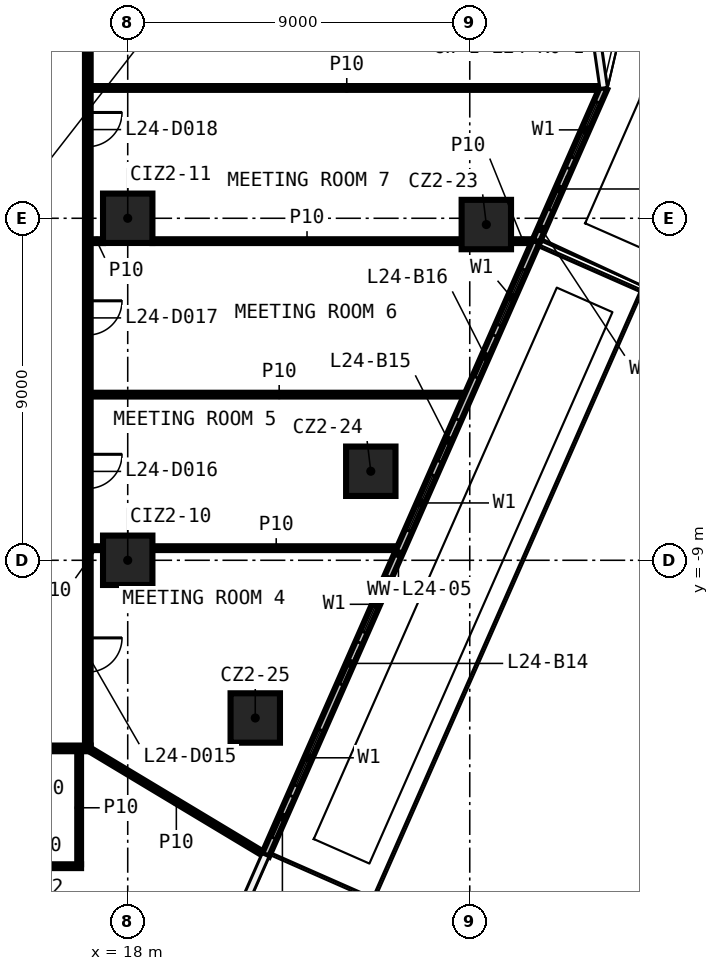
"""IFC4 building model, lengths in metres.
Left out: names, types, materials, properties, quantities, classifications, styles, units other than length and angle.
Written with IfcOpenShell. Run it as: python <this file> out.ifc"""

import sys

from ifc_helpers import new_model, si_unit, direction, frame, frame_2d, origin, origin_2d, place, context, subcontext, project, spatial, rectangle, extrude, element, fill, save


model = new_model("IFC4")
c1 = context("Model", 3, precision=1e-05, world=origin(), true_north=direction((0.0, 1.0)))
c2 = subcontext(c1, "Body", "Model", "MODEL_VIEW")
j1 = project(units=[si_unit("LENGTHUNIT", "METRE"), si_unit("PLANEANGLEUNIT", "RADIAN")], contexts=[c1])
p1 = place(None, origin())
s1 = spatial("IfcSite", under=j1, at=p1, CompositionType="ELEMENT")
p2 = place(p1, origin())
s2 = spatial("IfcBuilding", under=s1, at=p2, CompositionType="ELEMENT")
p3 = place(p2, frame((0.0, 0.0, 113.7)))
s3 = spatial("IfcBuildingStorey", under=s2, at=p3, CompositionType="ELEMENT", Elevation=113.7)
for number, where, z_axis, x_axis in (
    (1, (27.436, -0.165, 0.0), (0.0, 0.0, 1.0), (1.0, 0.0, 0.0)),
    (2, (24.396, -6.657, 0.0), (0.0, 0.0, 1.0), (1.0, 0.0, 0.0)),
    (3, (21.356, -13.15, 0.0), (0.0, 0.0, 1.0), (1.0, 0.0, 0.0)),
    (4, (18.0, -9.0, 0.0), (0.0, 0.0, 1.0), (1.0, 0.0, 0.0)),
    (5, (18.0, 0.0, 0.0), (0.0, 0.0, 1.0), (1.0, 0.0, 0.0)),
):
    element("IfcColumn", number, at=place(p3, frame(where, z_axis=z_axis, x_axis=x_axis)), inside=s3, PredefinedType="COLUMN", context=c2, shape_type="SweptSolid", body=[
        extrude(rectangle(XDim=1.3, YDim=1.3, at=origin_2d()), origin(), (0.0, 0.0, 1.0), 3.3),
    ])
p4 = place(p3, frame((14.272, -17.05, 0.0), z_axis=(0.0, 0.0, 1.0), x_axis=(1.0, 0.0, 0.0)))
e6 = element("IfcWall", 6, at=p4, inside=s3, PredefinedType="PARTITIONING", context=c2, shape_type="SweptSolid", body=[
    extrude(rectangle(XDim=2.5, YDim=0.1, at=frame_2d((1.25, 0.0))), origin(), (0.0, 0.0, 1.0), 3.3),
])
p5 = place(p3, frame((17.025, -13.95, 0.0), z_axis=(0.0, 0.0, 1.0), x_axis=(-1.0, 0.0, 0.0)))
e7 = element("IfcWall", 7, at=p5, inside=s3, PredefinedType="PARTITIONING", context=c2, shape_type="SweptSolid", body=[
    extrude(rectangle(XDim=34.05, YDim=0.15, at=frame_2d((17.025, 0.0))), origin(), (0.0, 0.0, 1.0), 3.3),
])
p6 = place(p5, frame((31.974, 0.0, 0.0)))
e8 = element("IfcOpeningElement", 8, at=p6, cuts=e7, PredefinedType="OPENING", context=c2, shape_type="SweptSolid", body=[
    extrude(rectangle(XDim=0.9, YDim=2.1, at=frame_2d((0.45, 1.05))), frame((0.0, 0.085, 0.0), z_axis=(0.0, -1.0, 0.0), x_axis=(1.0, 0.0, 0.0)), (0.0, 0.0, 1.0), 0.17),
])
p7 = place(p5, frame((27.543, 0.0, 0.0)))
e9 = element("IfcOpeningElement", 9, at=p7, cuts=e7, PredefinedType="OPENING", context=c2, shape_type="SweptSolid", body=[
    extrude(rectangle(XDim=1.0, YDim=2.1, at=frame_2d((0.5, 1.05))), frame((0.0, 0.085, 0.0), z_axis=(0.0, -1.0, 0.0), x_axis=(1.0, 0.0, 0.0)), (0.0, 0.0, 1.0), 0.17),
])
p8 = place(p5, frame((16.333, 0.0, 0.0)))
e10 = element("IfcOpeningElement", 10, at=p8, cuts=e7, PredefinedType="OPENING", context=c2, shape_type="SweptSolid", body=[
    extrude(rectangle(XDim=1.0, YDim=2.1, at=frame_2d((0.5, 1.05))), frame((0.0, 0.085, 0.0), z_axis=(0.0, -1.0, 0.0), x_axis=(1.0, 0.0, 0.0)), (0.0, 0.0, 1.0), 0.17),
])
p9 = place(p5, frame((12.006, 0.0, 0.0)))
e11 = element("IfcOpeningElement", 11, at=p9, cuts=e7, PredefinedType="OPENING", context=c2, shape_type="SweptSolid", body=[
    extrude(rectangle(XDim=1.0, YDim=2.1, at=frame_2d((0.5, 1.05))), frame((0.0, 0.085, 0.0), z_axis=(0.0, -1.0, 0.0), x_axis=(1.0, 0.0, 0.0)), (0.0, 0.0, 1.0), 0.17),
])
p10 = place(p5, frame((5.124, 0.0, 0.0)))
e12 = element("IfcOpeningElement", 12, at=p10, cuts=e7, PredefinedType="OPENING", context=c2, shape_type="SweptSolid", body=[
    extrude(rectangle(XDim=1.0, YDim=2.1, at=frame_2d((0.5, 1.05))), frame((0.0, 0.085, 0.0), z_axis=(0.0, -1.0, 0.0), x_axis=(1.0, 0.0, 0.0)), (0.0, 0.0, 1.0), 0.17),
])
p11 = place(p5, frame((3.144, 0.0, 0.0)))
e13 = element("IfcOpeningElement", 13, at=p11, cuts=e7, PredefinedType="OPENING", context=c2, shape_type="SweptSolid", body=[
    extrude(rectangle(XDim=1.0, YDim=2.1, at=frame_2d((0.5, 1.05))), frame((0.0, 0.085, 0.0), z_axis=(0.0, -1.0, 0.0), x_axis=(1.0, 0.0, 0.0)), (0.0, 0.0, 1.0), 0.17),
])
p12 = place(p3, frame((17.025, -8.681, 0.0), z_axis=(0.0, 0.0, 1.0), x_axis=(1.0, 0.0, 0.0)))
e14 = element("IfcWall", 14, at=p12, inside=s3, PredefinedType="PARTITIONING", context=c2, shape_type="SweptSolid", body=[
    extrude(rectangle(XDim=0.325, YDim=0.1, at=frame_2d((0.163, 0.0))), origin(), (0.0, 0.0, 1.0), 3.3),
])
p13 = place(p3, frame((18.65, -8.681, 0.0), z_axis=(0.0, 0.0, 1.0), x_axis=(1.0, 0.0, 0.0)))
e15 = element("IfcWall", 15, at=p13, inside=s3, PredefinedType="PARTITIONING", context=c2, shape_type="SweptSolid", body=[
    extrude(rectangle(XDim=6.515, YDim=0.1, at=frame_2d((3.258, 0.0))), origin(), (0.0, 0.0, 1.0), 3.3),
])
p14 = place(p3, frame((17.025, -4.641, 0.0), z_axis=(0.0, 0.0, 1.0), x_axis=(1.0, 0.0, 0.0)))
e16 = element("IfcWall", 16, at=p14, inside=s3, PredefinedType="PARTITIONING", context=c2, shape_type="SweptSolid", body=[
    extrude(rectangle(XDim=9.92, YDim=0.1, at=frame_2d((4.96, 0.0))), origin(), (0.0, 0.0, 1.0), 3.3),
])
p15 = place(p3, frame((17.025, -0.602, 0.0), z_axis=(0.0, 0.0, 1.0), x_axis=(1.0, 0.0, 0.0)))
e17 = element("IfcWall", 17, at=p15, inside=s3, PredefinedType="PARTITIONING", context=c2, shape_type="SweptSolid", body=[
    extrude(rectangle(XDim=0.325, YDim=0.1, at=frame_2d((0.163, 0.0))), origin(), (0.0, 0.0, 1.0), 3.3),
])
p16 = place(p3, frame((18.65, -0.602, 0.0), z_axis=(0.0, 0.0, 1.0), x_axis=(1.0, 0.0, 0.0)))
e18 = element("IfcWall", 18, at=p16, inside=s3, PredefinedType="PARTITIONING", context=c2, shape_type="SweptSolid", body=[
    extrude(rectangle(XDim=8.136, YDim=0.1, at=frame_2d((4.068, 0.0))), origin(), (0.0, 0.0, 1.0), 3.3),
])
p17 = place(p3, frame((28.086, -0.602, 0.0), z_axis=(0.0, 0.0, 1.0), x_axis=(1.0, 0.0, 0.0)))
e19 = element("IfcWall", 19, at=p17, inside=s3, PredefinedType="PARTITIONING", context=c2, shape_type="SweptSolid", body=[
    extrude(rectangle(XDim=0.64, YDim=0.1, at=frame_2d((0.32, 0.0))), origin(), (0.0, 0.0, 1.0), 3.3),
])
p18 = place(p3, frame((17.025, 3.429, 0.0), z_axis=(0.0, 0.0, 1.0), x_axis=(1.0, 0.0, 0.0)))
e20 = element("IfcWall", 20, at=p18, inside=s3, PredefinedType="PARTITIONING", context=c2, shape_type="SweptSolid", body=[
    extrude(rectangle(XDim=13.477, YDim=0.1, at=frame_2d((6.739, 0.0))), origin(), (0.0, 0.0, 1.0), 3.3),
])
p19 = place(p3, frame((16.95, 13.875, 0.0), z_axis=(0.0, 0.0, 1.0), x_axis=(0.0, -1.0, 0.0)))
e21 = element("IfcWall", 21, at=p19, inside=s3, PredefinedType="PARTITIONING", context=c2, shape_type="SweptSolid", body=[
    extrude(rectangle(XDim=27.75, YDim=0.15, at=frame_2d((13.875, 0.0))), origin(), (0.0, 0.0, 1.0), 3.3),
])
p20 = place(p19, frame((24.917, 0.0, 0.0)))
e22 = element("IfcOpeningElement", 22, at=p20, cuts=e21, PredefinedType="OPENING", context=c2, shape_type="SweptSolid", body=[
    extrude(rectangle(XDim=0.9, YDim=2.1, at=frame_2d((0.45, 1.05))), frame((0.0, 0.085, 0.0), z_axis=(0.0, -1.0, 0.0), x_axis=(1.0, 0.0, 0.0)), (0.0, 0.0, 1.0), 0.17),
])
p21 = place(p19, frame((20.086, 0.0, 0.0)))
e23 = element("IfcOpeningElement", 23, at=p21, cuts=e21, PredefinedType="OPENING", context=c2, shape_type="SweptSolid", body=[
    extrude(rectangle(XDim=0.9, YDim=2.1, at=frame_2d((0.45, 1.05))), frame((0.0, 0.085, 0.0), z_axis=(0.0, -1.0, 0.0), x_axis=(1.0, 0.0, 0.0)), (0.0, 0.0, 1.0), 0.17),
])
p22 = place(p19, frame((16.047, 0.0, 0.0)))
e24 = element("IfcOpeningElement", 24, at=p22, cuts=e21, PredefinedType="OPENING", context=c2, shape_type="SweptSolid", body=[
    extrude(rectangle(XDim=0.9, YDim=2.1, at=frame_2d((0.45, 1.05))), frame((0.0, 0.085, 0.0), z_axis=(0.0, -1.0, 0.0), x_axis=(1.0, 0.0, 0.0)), (0.0, 0.0, 1.0), 0.17),
])
p23 = place(p19, frame((11.091, 0.0, 0.0)))
e25 = element("IfcOpeningElement", 25, at=p23, cuts=e21, PredefinedType="OPENING", context=c2, shape_type="SweptSolid", body=[
    extrude(rectangle(XDim=0.9, YDim=2.1, at=frame_2d((0.45, 1.05))), frame((0.0, 0.085, 0.0), z_axis=(0.0, -1.0, 0.0), x_axis=(1.0, 0.0, 0.0)), (0.0, 0.0, 1.0), 0.17),
])
p24 = place(p19, frame((7.093, 0.0, 0.0)))
e26 = element("IfcOpeningElement", 26, at=p24, cuts=e21, PredefinedType="OPENING", context=c2, shape_type="SweptSolid", body=[
    extrude(rectangle(XDim=0.9, YDim=2.1, at=frame_2d((0.45, 1.05))), frame((0.0, 0.085, 0.0), z_axis=(0.0, -1.0, 0.0), x_axis=(1.0, 0.0, 0.0)), (0.0, 0.0, 1.0), 0.17),
])
p25 = place(p19, frame((2.057, 0.0, 0.0)))
e27 = element("IfcOpeningElement", 27, at=p25, cuts=e21, PredefinedType="OPENING", context=c2, shape_type="SweptSolid", body=[
    extrude(rectangle(XDim=0.9, YDim=2.1, at=frame_2d((0.45, 1.05))), frame((0.0, 0.085, 0.0), z_axis=(0.0, -1.0, 0.0), x_axis=(1.0, 0.0, 0.0)), (0.0, 0.0, 1.0), 0.17),
])
p26 = place(p3, frame((16.722, -17.0, 0.0), z_axis=(0.0, 0.0, 1.0), x_axis=(0.0, 1.0, 0.0)))
e28 = element("IfcWall", 28, at=p26, inside=s3, PredefinedType="PARTITIONING", context=c2, shape_type="SweptSolid", body=[
    extrude(rectangle(XDim=2.975, YDim=0.1, at=frame_2d((1.488, 0.0))), origin(), (0.0, 0.0, 1.0), 3.3),
])
p27 = place(p3, frame((16.95, -13.95, 0.0), z_axis=(0.0, 0.0, 1.0), x_axis=(0.857183640751, -0.515010879525, 0.0)))
e29 = element("IfcWall", 29, at=p27, inside=s3, PredefinedType="PARTITIONING", context=c2, shape_type="SweptSolid", body=[
    extrude(rectangle(XDim=5.436, YDim=0.1, at=frame_2d((2.718, 0.0))), origin(), (0.0, 0.0, 1.0), 3.3),
])
p28 = place(p3, frame((21.626, -16.76, 0.0), z_axis=(0.0, 0.0, 1.0), x_axis=(0.403293642116, 0.915070619258, 0.0)))
e30 = element("IfcWall", 30, at=p28, inside=s3, PredefinedType="SOLIDWALL", context=c2, shape_type="SweptSolid", body=[
    extrude(rectangle(XDim=17.657, YDim=0.2, at=frame_2d((8.829, 0.0))), origin(), (0.0, 0.0, 1.0), 3.3),
])
p29 = place(p28, frame((2.0, 0.0, 0.6)))
e31 = element("IfcOpeningElement", 31, at=p29, cuts=e30, PredefinedType="OPENING", context=c2, shape_type="SweptSolid", body=[
    extrude(rectangle(XDim=1.6, YDim=2.4, at=frame_2d((0.8, 1.2))), frame((0.0, 0.11, 0.0), z_axis=(0.0, -1.0, 0.0), x_axis=(1.0, 0.0, 0.0)), (0.0, 0.0, 1.0), 0.22),
])
p30 = place(p28, frame((0.5, 0.0, 0.0)))
e32 = element("IfcOpeningElement", 32, at=p30, cuts=e30, PredefinedType="OPENING", context=c2, shape_type="SweptSolid", body=[
    extrude(rectangle(XDim=1.2, YDim=2.4, at=frame_2d((0.6, 1.2))), frame((0.0, 0.11, 0.0), z_axis=(0.0, -1.0, 0.0), x_axis=(1.0, 0.0, 0.0)), (0.0, 0.0, 1.0), 0.22),
])
p31 = place(p28, frame((6.414, 0.0, 0.6)))
e33 = element("IfcOpeningElement", 33, at=p31, cuts=e30, PredefinedType="OPENING", context=c2, shape_type="SweptSolid", body=[
    extrude(rectangle(XDim=1.6, YDim=2.4, at=frame_2d((0.8, 1.2))), frame((0.0, 0.11, 0.0), z_axis=(0.0, -1.0, 0.0), x_axis=(1.0, 0.0, 0.0)), (0.0, 0.0, 1.0), 0.22),
])
p32 = place(p28, frame((4.914, 0.0, 0.0)))
e34 = element("IfcOpeningElement", 34, at=p32, cuts=e30, PredefinedType="OPENING", context=c2, shape_type="SweptSolid", body=[
    extrude(rectangle(XDim=1.2, YDim=2.4, at=frame_2d((0.6, 1.2))), frame((0.0, 0.11, 0.0), z_axis=(0.0, -1.0, 0.0), x_axis=(1.0, 0.0, 0.0)), (0.0, 0.0, 1.0), 0.22),
])
p33 = place(p28, frame((9.329, 0.0, 0.6)))
e35 = element("IfcOpeningElement", 35, at=p33, cuts=e30, PredefinedType="OPENING", context=c2, shape_type="SweptSolid", body=[
    extrude(rectangle(XDim=1.6, YDim=2.4, at=frame_2d((0.8, 1.2))), frame((0.0, 0.11, 0.0), z_axis=(0.0, -1.0, 0.0), x_axis=(1.0, 0.0, 0.0)), (0.0, 0.0, 1.0), 0.22),
])
p34 = place(p28, frame((11.329, 0.0, 0.0)))
e36 = element("IfcOpeningElement", 36, at=p34, cuts=e30, PredefinedType="OPENING", context=c2, shape_type="SweptSolid", body=[
    extrude(rectangle(XDim=1.2, YDim=2.4, at=frame_2d((0.6, 1.2))), frame((0.0, 0.11, 0.0), z_axis=(0.0, -1.0, 0.0), x_axis=(1.0, 0.0, 0.0)), (0.0, 0.0, 1.0), 0.22),
])
p35 = place(p28, frame((15.243, 0.0, 0.6)))
e37 = element("IfcOpeningElement", 37, at=p35, cuts=e30, PredefinedType="OPENING", context=c2, shape_type="SweptSolid", body=[
    extrude(rectangle(XDim=1.6, YDim=2.4, at=frame_2d((0.8, 1.2))), frame((0.0, 0.11, 0.0), z_axis=(0.0, -1.0, 0.0), x_axis=(1.0, 0.0, 0.0)), (0.0, 0.0, 1.0), 0.22),
])
p36 = place(p28, frame((13.743, 0.0, 0.0)))
e38 = element("IfcOpeningElement", 38, at=p36, cuts=e30, PredefinedType="OPENING", context=c2, shape_type="SweptSolid", body=[
    extrude(rectangle(XDim=1.2, YDim=2.4, at=frame_2d((0.6, 1.2))), frame((0.0, 0.11, 0.0), z_axis=(0.0, -1.0, 0.0), x_axis=(1.0, 0.0, 0.0)), (0.0, 0.0, 1.0), 0.22),
])
p37 = place(p3, frame((28.748, -0.602, 0.0), z_axis=(0.0, 0.0, 1.0), x_axis=(0.403256746057, 0.91508687935, 0.0)))
e39 = element("IfcWall", 39, at=p37, inside=s3, PredefinedType="SOLIDWALL", context=c2, shape_type="SweptSolid", body=[
    extrude(rectangle(XDim=4.405, YDim=0.2, at=frame_2d((2.203, 0.0))), origin(), (0.0, 0.0, 1.0), 3.3),
])
p38 = place(p37, frame((2.4, 0.0, 0.6)))
e40 = element("IfcOpeningElement", 40, at=p38, cuts=e39, PredefinedType="OPENING", context=c2, shape_type="SweptSolid", body=[
    extrude(rectangle(XDim=1.6, YDim=2.4, at=frame_2d((0.8, 1.2))), frame((0.0, 0.11, 0.0), z_axis=(0.0, -1.0, 0.0), x_axis=(1.0, 0.0, 0.0)), (0.0, 0.0, 1.0), 0.22),
])
p39 = place(p37, frame((0.9, 0.0, 0.0)))
e41 = element("IfcOpeningElement", 41, at=p39, cuts=e39, PredefinedType="OPENING", context=c2, shape_type="SweptSolid", body=[
    extrude(rectangle(XDim=1.2, YDim=2.4, at=frame_2d((0.6, 1.2))), frame((0.0, 0.11, 0.0), z_axis=(0.0, -1.0, 0.0), x_axis=(1.0, 0.0, 0.0)), (0.0, 0.0, 1.0), 0.22),
])
p40 = place(p20, origin())
e42 = element("IfcDoor", 42, at=p40, inside=s3, OperationType="SINGLE_SWING_RIGHT", PredefinedType="DOOR", context=c2, shape_type="SweptSolid", body=[
    extrude(rectangle(XDim=0.9, YDim=2.1, at=frame_2d((0.45, 1.05))), frame((0.0, 0.025, 0.0), z_axis=(0.0, -1.0, 0.0), x_axis=(1.0, 0.0, 0.0)), (0.0, 0.0, 1.0), 0.05),
])
fill(e22, e42)
p41 = place(p21, origin())
e43 = element("IfcDoor", 43, at=p41, inside=s3, OperationType="SINGLE_SWING_LEFT", PredefinedType="DOOR", context=c2, shape_type="SweptSolid", body=[
    extrude(rectangle(XDim=0.9, YDim=2.1, at=frame_2d((0.45, 1.05))), frame((0.0, 0.025, 0.0), z_axis=(0.0, -1.0, 0.0), x_axis=(1.0, 0.0, 0.0)), (0.0, 0.0, 1.0), 0.05),
])
fill(e23, e43)
p42 = place(p22, origin())
e44 = element("IfcDoor", 44, at=p42, inside=s3, OperationType="SINGLE_SWING_RIGHT", PredefinedType="DOOR", context=c2, shape_type="SweptSolid", body=[
    extrude(rectangle(XDim=0.9, YDim=2.1, at=frame_2d((0.45, 1.05))), frame((0.0, 0.025, 0.0), z_axis=(0.0, -1.0, 0.0), x_axis=(1.0, 0.0, 0.0)), (0.0, 0.0, 1.0), 0.05),
])
fill(e24, e44)
p43 = place(p23, origin())
e45 = element("IfcDoor", 45, at=p43, inside=s3, OperationType="SINGLE_SWING_LEFT", PredefinedType="DOOR", context=c2, shape_type="SweptSolid", body=[
    extrude(rectangle(XDim=0.9, YDim=2.1, at=frame_2d((0.45, 1.05))), frame((0.0, 0.025, 0.0), z_axis=(0.0, -1.0, 0.0), x_axis=(1.0, 0.0, 0.0)), (0.0, 0.0, 1.0), 0.05),
])
fill(e25, e45)
p44 = place(p29, origin())
e46 = element("IfcWindow", 46, at=p44, inside=s3, PartitioningType="SINGLE_PANEL", PredefinedType="WINDOW", context=c2, shape_type="SweptSolid", body=[
    extrude(rectangle(XDim=1.6, YDim=2.4, at=frame_2d((0.8, 1.2))), frame((0.0, 0.03, 0.0), z_axis=(0.0, -1.0, 0.0), x_axis=(1.0, 0.0, 0.0)), (0.0, 0.0, 1.0), 0.06),
])
fill(e31, e46)
p45 = place(p30, origin())
e47 = element("IfcDoor", 47, at=p45, inside=s3, OperationType="SLIDING_TO_LEFT", PredefinedType="DOOR", context=c2, shape_type="SweptSolid", body=[
    extrude(rectangle(XDim=1.2, YDim=2.4, at=frame_2d((0.6, 1.2))), frame((0.0, 0.025, 0.0), z_axis=(0.0, -1.0, 0.0), x_axis=(1.0, 0.0, 0.0)), (0.0, 0.0, 1.0), 0.05),
])
fill(e32, e47)
p46 = place(p31, origin())
e48 = element("IfcWindow", 48, at=p46, inside=s3, PartitioningType="SINGLE_PANEL", PredefinedType="WINDOW", context=c2, shape_type="SweptSolid", body=[
    extrude(rectangle(XDim=1.6, YDim=2.4, at=frame_2d((0.8, 1.2))), frame((0.0, 0.03, 0.0), z_axis=(0.0, -1.0, 0.0), x_axis=(1.0, 0.0, 0.0)), (0.0, 0.0, 1.0), 0.06),
])
fill(e33, e48)
p47 = place(p32, origin())
e49 = element("IfcDoor", 49, at=p47, inside=s3, OperationType="SLIDING_TO_LEFT", PredefinedType="DOOR", context=c2, shape_type="SweptSolid", body=[
    extrude(rectangle(XDim=1.2, YDim=2.4, at=frame_2d((0.6, 1.2))), frame((0.0, 0.025, 0.0), z_axis=(0.0, -1.0, 0.0), x_axis=(1.0, 0.0, 0.0)), (0.0, 0.0, 1.0), 0.05),
])
fill(e34, e49)
p48 = place(p33, origin())
e50 = element("IfcWindow", 50, at=p48, inside=s3, PartitioningType="SINGLE_PANEL", PredefinedType="WINDOW", context=c2, shape_type="SweptSolid", body=[
    extrude(rectangle(XDim=1.6, YDim=2.4, at=frame_2d((0.8, 1.2))), frame((0.0, 0.03, 0.0), z_axis=(0.0, -1.0, 0.0), x_axis=(1.0, 0.0, 0.0)), (0.0, 0.0, 1.0), 0.06),
])
fill(e35, e50)
p49 = place(p34, origin())
e51 = element("IfcDoor", 51, at=p49, inside=s3, OperationType="SLIDING_TO_LEFT", PredefinedType="DOOR", context=c2, shape_type="SweptSolid", body=[
    extrude(rectangle(XDim=1.2, YDim=2.4, at=frame_2d((0.6, 1.2))), frame((0.0, 0.025, 0.0), z_axis=(0.0, -1.0, 0.0), x_axis=(1.0, 0.0, 0.0)), (0.0, 0.0, 1.0), 0.05),
])
fill(e36, e51)
p50 = place(p35, origin())
e52 = element("IfcWindow", 52, at=p50, inside=s3, PartitioningType="SINGLE_PANEL", PredefinedType="WINDOW", context=c2, shape_type="SweptSolid", body=[
    extrude(rectangle(XDim=1.6, YDim=2.4, at=frame_2d((0.8, 1.2))), frame((0.0, 0.03, 0.0), z_axis=(0.0, -1.0, 0.0), x_axis=(1.0, 0.0, 0.0)), (0.0, 0.0, 1.0), 0.06),
])
fill(e37, e52)
p51 = place(p36, origin())
e53 = element("IfcDoor", 53, at=p51, inside=s3, OperationType="SLIDING_TO_LEFT", PredefinedType="DOOR", context=c2, shape_type="SweptSolid", body=[
    extrude(rectangle(XDim=1.2, YDim=2.4, at=frame_2d((0.6, 1.2))), frame((0.0, 0.025, 0.0), z_axis=(0.0, -1.0, 0.0), x_axis=(1.0, 0.0, 0.0)), (0.0, 0.0, 1.0), 0.05),
])
fill(e38, e53)
p52 = place(p38, origin())
e54 = element("IfcWindow", 54, at=p52, inside=s3, PartitioningType="SINGLE_PANEL", PredefinedType="WINDOW", context=c2, shape_type="SweptSolid", body=[
    extrude(rectangle(XDim=1.6, YDim=2.4, at=frame_2d((0.8, 1.2))), frame((0.0, 0.03, 0.0), z_axis=(0.0, -1.0, 0.0), x_axis=(1.0, 0.0, 0.0)), (0.0, 0.0, 1.0), 0.06),
])
fill(e40, e54)
p53 = place(p39, origin())
e55 = element("IfcDoor", 55, at=p53, inside=s3, OperationType="SLIDING_TO_LEFT", PredefinedType="DOOR", context=c2, shape_type="SweptSolid", body=[
    extrude(rectangle(XDim=1.2, YDim=2.4, at=frame_2d((0.6, 1.2))), frame((0.0, 0.025, 0.0), z_axis=(0.0, -1.0, 0.0), x_axis=(1.0, 0.0, 0.0)), (0.0, 0.0, 1.0), 0.05),
])
fill(e41, e55)
save(model, sys.argv[1])
